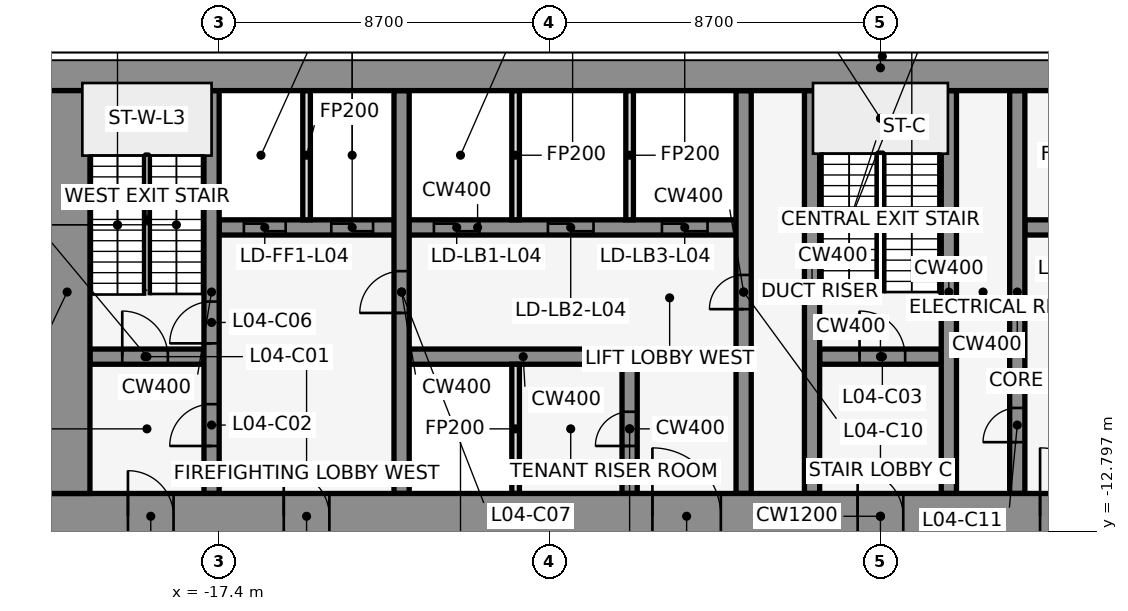
"""IFC4 building model, lengths in metres.
Left out: names, types, materials, properties, quantities, classifications, styles, units other than length and angle.
Written with IfcOpenShell. Run it as: python <this file> out.ifc"""

import sys

from ifc_helpers import new_model, si_unit, direction, frame, frame_2d, origin, place, context, subcontext, project, spatial, rectangle, extrude, element, fill, save


model = new_model("IFC4")
c1 = context("Model", 3, precision=1e-05, world=origin(), true_north=direction((0.0, 1.0)))
c2 = subcontext(c1, "Body", "Model", "MODEL_VIEW")
j1 = project(units=[si_unit("LENGTHUNIT", "METRE"), si_unit("PLANEANGLEUNIT", "RADIAN")], contexts=[c1])
p1 = place(None, origin())
s1 = spatial("IfcSite", under=j1, at=p1, CompositionType="ELEMENT")
p2 = place(p1, origin())
s2 = spatial("IfcBuilding", under=s1, at=p2, CompositionType="ELEMENT")
p3 = place(p2, frame((0.0, 0.0, 25.0)))
s3 = spatial("IfcBuildingStorey", under=s2, at=p3, CompositionType="ELEMENT", Elevation=25.0)
p4 = place(p3, frame((-20.8, -8.2, 0.0), z_axis=(0.0, 0.0, 1.0), x_axis=(1.0, 0.0, 0.0)))
e1 = element("IfcWall", 1, at=p4, inside=s3, PredefinedType="SHEAR", context=c2, shape_type="SweptSolid", body=[
    extrude(rectangle(XDim=3.0, YDim=0.4, at=frame_2d((1.5, 0.0))), origin(), (0.0, 0.0, 1.0), 5.0),
])
p5 = place(p4, frame((0.85, 0.0, 0.0)))
e2 = element("IfcOpeningElement", 2, at=p5, cuts=e1, PredefinedType="OPENING", context=c2, shape_type="SweptSolid", body=[
    extrude(rectangle(XDim=1.2, YDim=2.1, at=frame_2d((0.6, 1.05))), frame((0.0, 0.212, 0.0), z_axis=(0.0, -1.0, 0.0), x_axis=(1.0, 0.0, 0.0)), (0.0, 0.0, 1.0), 0.424),
])
p6 = place(p3, frame((-12.4, -8.2, 0.0), z_axis=(0.0, 0.0, 1.0), x_axis=(1.0, 0.0, 0.0)))
e3 = element("IfcWall", 3, at=p6, inside=s3, PredefinedType="SHEAR", context=c2, shape_type="SweptSolid", body=[
    extrude(rectangle(XDim=6.0, YDim=0.4, at=frame_2d((3.0, 0.0))), origin(), (0.0, 0.0, 1.0), 5.0),
])
p7 = place(p3, frame((-1.6, -8.2, 0.0), z_axis=(0.0, 0.0, 1.0), x_axis=(1.0, 0.0, 0.0)))
e4 = element("IfcWall", 4, at=p7, inside=s3, PredefinedType="SHEAR", context=c2, shape_type="SweptSolid", body=[
    extrude(rectangle(XDim=3.2, YDim=0.4, at=frame_2d((1.6, 0.0))), origin(), (0.0, 0.0, 1.0), 5.0),
])
p8 = place(p7, frame((1.05, 0.0, 0.0)))
e5 = element("IfcOpeningElement", 5, at=p8, cuts=e4, PredefinedType="OPENING", context=c2, shape_type="SweptSolid", body=[
    extrude(rectangle(XDim=1.2, YDim=2.1, at=frame_2d((0.6, 1.05))), frame((0.0, 0.212, 0.0), z_axis=(0.0, -1.0, 0.0), x_axis=(1.0, 0.0, 0.0)), (0.0, 0.0, 1.0), 0.424),
])
p9 = place(p3, frame((-17.4, -4.8, 0.0), z_axis=(0.0, 0.0, 1.0), x_axis=(1.0, 0.0, 0.0)))
e6 = element("IfcWall", 6, at=p9, inside=s3, PredefinedType="SHEAR", context=c2, shape_type="SweptSolid", body=[
    extrude(rectangle(XDim=13.6, YDim=0.4, at=frame_2d((6.8, 0.0))), origin(), (0.0, 0.0, 1.0), 5.0),
])
p10 = place(p9, frame((0.65, 0.0, 0.0)))
e7 = element("IfcOpeningElement", 7, at=p10, cuts=e6, PredefinedType="OPENING", context=c2, shape_type="SweptSolid", body=[
    extrude(rectangle(XDim=1.1, YDim=2.1, at=frame_2d((0.55, 1.05))), frame((0.0, 0.212, 0.0), z_axis=(0.0, -1.0, 0.0), x_axis=(1.0, 0.0, 0.0)), (0.0, 0.0, 1.0), 0.424),
])
p11 = place(p9, frame((2.95, 0.0, 0.0)))
e8 = element("IfcOpeningElement", 8, at=p11, cuts=e6, PredefinedType="OPENING", context=c2, shape_type="SweptSolid", body=[
    extrude(rectangle(XDim=1.1, YDim=2.1, at=frame_2d((0.55, 1.05))), frame((0.0, 0.212, 0.0), z_axis=(0.0, -1.0, 0.0), x_axis=(1.0, 0.0, 0.0)), (0.0, 0.0, 1.0), 0.424),
])
p12 = place(p9, frame((5.65, 0.0, 0.0)))
e9 = element("IfcOpeningElement", 9, at=p12, cuts=e6, PredefinedType="OPENING", context=c2, shape_type="SweptSolid", body=[
    extrude(rectangle(XDim=1.2, YDim=2.1, at=frame_2d((0.6, 1.05))), frame((0.0, 0.212, 0.0), z_axis=(0.0, -1.0, 0.0), x_axis=(1.0, 0.0, 0.0)), (0.0, 0.0, 1.0), 0.424),
])
p13 = place(p9, frame((8.65, 0.0, 0.0)))
e10 = element("IfcOpeningElement", 10, at=p13, cuts=e6, PredefinedType="OPENING", context=c2, shape_type="SweptSolid", body=[
    extrude(rectangle(XDim=1.2, YDim=2.1, at=frame_2d((0.6, 1.05))), frame((0.0, 0.212, 0.0), z_axis=(0.0, -1.0, 0.0), x_axis=(1.0, 0.0, 0.0)), (0.0, 0.0, 1.0), 0.424),
])
p14 = place(p9, frame((11.65, 0.0, 0.0)))
e11 = element("IfcOpeningElement", 11, at=p14, cuts=e6, PredefinedType="OPENING", context=c2, shape_type="SweptSolid", body=[
    extrude(rectangle(XDim=1.2, YDim=2.1, at=frame_2d((0.6, 1.05))), frame((0.0, 0.212, 0.0), z_axis=(0.0, -1.0, 0.0), x_axis=(1.0, 0.0, 0.0)), (0.0, 0.0, 1.0), 0.424),
])
p15 = place(p3, frame((3.8, -4.8, 0.0), z_axis=(0.0, 0.0, 1.0), x_axis=(1.0, 0.0, 0.0)))
e12 = element("IfcWall", 12, at=p15, inside=s3, PredefinedType="SHEAR", context=c2, shape_type="SweptSolid", body=[
    extrude(rectangle(XDim=13.6, YDim=0.4, at=frame_2d((6.8, 0.0))), origin(), (0.0, 0.0, 1.0), 5.0),
])
p16 = place(p15, frame((9.45, 0.0, 0.0)))
e13 = element("IfcOpeningElement", 13, at=p16, cuts=e12, PredefinedType="OPENING", context=c2, shape_type="SweptSolid", body=[
    extrude(rectangle(XDim=1.1, YDim=2.1, at=frame_2d((0.55, 1.05))), frame((0.0, 0.212, 0.0), z_axis=(0.0, -1.0, 0.0), x_axis=(1.0, 0.0, 0.0)), (0.0, 0.0, 1.0), 0.424),
])
p17 = place(p15, frame((11.85, 0.0, 0.0)))
e14 = element("IfcOpeningElement", 14, at=p17, cuts=e12, PredefinedType="OPENING", context=c2, shape_type="SweptSolid", body=[
    extrude(rectangle(XDim=1.1, YDim=2.1, at=frame_2d((0.55, 1.05))), frame((0.0, 0.212, 0.0), z_axis=(0.0, -1.0, 0.0), x_axis=(1.0, 0.0, 0.0)), (0.0, 0.0, 1.0), 0.424),
])
p18 = place(p15, frame((0.95, 0.0, 0.0)))
e15 = element("IfcOpeningElement", 15, at=p18, cuts=e12, PredefinedType="OPENING", context=c2, shape_type="SweptSolid", body=[
    extrude(rectangle(XDim=0.9, YDim=2.1, at=frame_2d((0.45, 1.05))), frame((0.0, 0.212, 0.0), z_axis=(0.0, -1.0, 0.0), x_axis=(1.0, 0.0, 0.0)), (0.0, 0.0, 1.0), 0.424),
])
p19 = place(p15, frame((3.85, 0.0, 0.0)))
e16 = element("IfcOpeningElement", 16, at=p19, cuts=e12, PredefinedType="OPENING", context=c2, shape_type="SweptSolid", body=[
    extrude(rectangle(XDim=0.9, YDim=2.1, at=frame_2d((0.45, 1.05))), frame((0.0, 0.212, 0.0), z_axis=(0.0, -1.0, 0.0), x_axis=(1.0, 0.0, 0.0)), (0.0, 0.0, 1.0), 0.424),
])
p20 = place(p15, frame((6.85, 0.0, 0.0)))
e17 = element("IfcOpeningElement", 17, at=p20, cuts=e12, PredefinedType="OPENING", context=c2, shape_type="SweptSolid", body=[
    extrude(rectangle(XDim=0.9, YDim=2.1, at=frame_2d((0.45, 1.05))), frame((0.0, 0.212, 0.0), z_axis=(0.0, -1.0, 0.0), x_axis=(1.0, 0.0, 0.0)), (0.0, 0.0, 1.0), 0.424),
])
p21 = place(p3, frame((-17.6, -11.8, 0.0), z_axis=(0.0, 0.0, 1.0), x_axis=(0.0, 1.0, 0.0)))
e18 = element("IfcWall", 18, at=p21, inside=s3, PredefinedType="SHEAR", context=c2, shape_type="SweptSolid", body=[
    extrude(rectangle(XDim=10.6, YDim=0.4, at=frame_2d((5.3, 0.0))), origin(), (0.0, 0.0, 1.0), 5.0),
])
p22 = place(p21, frame((1.25, 0.0, 0.0)))
e19 = element("IfcOpeningElement", 19, at=p22, cuts=e18, PredefinedType="OPENING", context=c2, shape_type="SweptSolid", body=[
    extrude(rectangle(XDim=1.1, YDim=2.1, at=frame_2d((0.55, 1.05))), frame((0.0, 0.212, 0.0), z_axis=(0.0, -1.0, 0.0), x_axis=(1.0, 0.0, 0.0)), (0.0, 0.0, 1.0), 0.424),
])
p23 = place(p21, frame((3.95, 0.0, 0.0)))
e20 = element("IfcOpeningElement", 20, at=p23, cuts=e18, PredefinedType="OPENING", context=c2, shape_type="SweptSolid", body=[
    extrude(rectangle(XDim=1.1, YDim=2.1, at=frame_2d((0.55, 1.05))), frame((0.0, 0.212, 0.0), z_axis=(0.0, -1.0, 0.0), x_axis=(1.0, 0.0, 0.0)), (0.0, 0.0, 1.0), 0.424),
])
p24 = place(p3, frame((-15.1, -4.6, 0.0), z_axis=(0.0, 0.0, 1.0), x_axis=(0.0, 1.0, 0.0)))
e21 = element("IfcWall", 21, at=p24, inside=s3, PredefinedType="PARTITIONING", context=c2, shape_type="SweptSolid", body=[
    extrude(rectangle(XDim=3.4, YDim=0.2, at=frame_2d((1.7, 0.0))), origin(), (0.0, 0.0, 1.0), 4.7),
])
p25 = place(p3, frame((-12.6, -11.8, 0.0), z_axis=(0.0, 0.0, 1.0), x_axis=(0.0, 1.0, 0.0)))
e22 = element("IfcWall", 22, at=p25, inside=s3, PredefinedType="SHEAR", context=c2, shape_type="SweptSolid", body=[
    extrude(rectangle(XDim=10.6, YDim=0.4, at=frame_2d((5.3, 0.0))), origin(), (0.0, 0.0, 1.0), 5.0),
])
p26 = place(p25, frame((4.75, 0.0, 0.0)))
e23 = element("IfcOpeningElement", 23, at=p26, cuts=e22, PredefinedType="OPENING", context=c2, shape_type="SweptSolid", body=[
    extrude(rectangle(XDim=1.1, YDim=2.1, at=frame_2d((0.55, 1.05))), frame((0.0, 0.212, 0.0), z_axis=(0.0, -1.0, 0.0), x_axis=(1.0, 0.0, 0.0)), (0.0, 0.0, 1.0), 0.424),
])
for number, where, z_axis, x_axis in (
    (24, (-9.6, -11.8, 0.0), (0.0, 0.0, 1.0), (0.0, 1.0, 0.0)),
    (25, (-9.6, -4.6, 0.0), (0.0, 0.0, 1.0), (0.0, 1.0, 0.0)),
):
    element("IfcWall", number, at=place(p3, frame(where, z_axis=z_axis, x_axis=x_axis)), inside=s3, PredefinedType="PARTITIONING", context=c2, shape_type="SweptSolid", body=[
        extrude(rectangle(XDim=3.4, YDim=0.2, at=frame_2d((1.7, 0.0))), origin(), (0.0, 0.0, 1.0), 4.7),
    ])
p27 = place(p3, frame((-6.6, -11.8, 0.0), z_axis=(0.0, 0.0, 1.0), x_axis=(0.0, 1.0, 0.0)))
e26 = element("IfcWall", 26, at=p27, inside=s3, PredefinedType="SHEAR", context=c2, shape_type="SweptSolid", body=[
    extrude(rectangle(XDim=3.4, YDim=0.4, at=frame_2d((1.7, 0.0))), origin(), (0.0, 0.0, 1.0), 5.0),
])
p28 = place(p27, frame((1.25, 0.0, 0.0)))
e27 = element("IfcOpeningElement", 27, at=p28, cuts=e26, PredefinedType="OPENING", context=c2, shape_type="SweptSolid", body=[
    extrude(rectangle(XDim=0.9, YDim=2.1, at=frame_2d((0.45, 1.05))), frame((0.0, 0.212, 0.0), z_axis=(0.0, -1.0, 0.0), x_axis=(1.0, 0.0, 0.0)), (0.0, 0.0, 1.0), 0.424),
])
p29 = place(p3, frame((-6.6, -4.6, 0.0), z_axis=(0.0, 0.0, 1.0), x_axis=(0.0, 1.0, 0.0)))
e28 = element("IfcWall", 28, at=p29, inside=s3, PredefinedType="PARTITIONING", context=c2, shape_type="SweptSolid", body=[
    extrude(rectangle(XDim=3.4, YDim=0.2, at=frame_2d((1.7, 0.0))), origin(), (0.0, 0.0, 1.0), 4.7),
])
p30 = place(p3, frame((-3.6, -11.8, 0.0), z_axis=(0.0, 0.0, 1.0), x_axis=(0.0, 1.0, 0.0)))
e29 = element("IfcWall", 29, at=p30, inside=s3, PredefinedType="SHEAR", context=c2, shape_type="SweptSolid", body=[
    extrude(rectangle(XDim=10.6, YDim=0.4, at=frame_2d((5.3, 0.0))), origin(), (0.0, 0.0, 1.0), 5.0),
])
p31 = place(p30, frame((4.85, 0.0, 0.0)))
e30 = element("IfcOpeningElement", 30, at=p31, cuts=e29, PredefinedType="OPENING", context=c2, shape_type="SweptSolid", body=[
    extrude(rectangle(XDim=0.9, YDim=2.1, at=frame_2d((0.45, 1.05))), frame((0.0, 0.212, 0.0), z_axis=(0.0, -1.0, 0.0), x_axis=(1.0, 0.0, 0.0)), (0.0, 0.0, 1.0), 0.424),
])
for number, where, z_axis, x_axis in (
    (31, (-1.8, -11.8, 0.0), (0.0, 0.0, 1.0), (0.0, 1.0, 0.0)),
    (32, (1.8, -11.8, 0.0), (0.0, 0.0, 1.0), (0.0, 1.0, 0.0)),
):
    element("IfcWall", number, at=place(p3, frame(where, z_axis=z_axis, x_axis=x_axis)), inside=s3, PredefinedType="SHEAR", context=c2, shape_type="SweptSolid", body=[
        extrude(rectangle(XDim=10.6, YDim=0.4, at=frame_2d((5.3, 0.0))), origin(), (0.0, 0.0, 1.0), 5.0),
    ])
p32 = place(p3, frame((3.6, -11.8, 0.0), z_axis=(0.0, 0.0, 1.0), x_axis=(0.0, 1.0, 0.0)))
e33 = element("IfcWall", 33, at=p32, inside=s3, PredefinedType="SHEAR", context=c2, shape_type="SweptSolid", body=[
    extrude(rectangle(XDim=10.6, YDim=0.4, at=frame_2d((5.3, 0.0))), origin(), (0.0, 0.0, 1.0), 5.0),
])
p33 = place(p32, frame((1.35, 0.0, 0.0)))
e34 = element("IfcOpeningElement", 34, at=p33, cuts=e33, PredefinedType="OPENING", context=c2, shape_type="SweptSolid", body=[
    extrude(rectangle(XDim=0.9, YDim=2.1, at=frame_2d((0.45, 1.05))), frame((0.0, 0.212, 0.0), z_axis=(0.0, -1.0, 0.0), x_axis=(1.0, 0.0, 0.0)), (0.0, 0.0, 1.0), 0.424),
])
p34 = place(p3, frame((-22.0, -0.6, 0.0), z_axis=(0.0, 0.0, 1.0), x_axis=(1.0, 0.0, 0.0)))
e35 = element("IfcWall", 35, at=p34, inside=s3, PredefinedType="SHEAR", context=c2, shape_type="SweptSolid", body=[
    extrude(rectangle(XDim=44.0, YDim=1.2, at=frame_2d((22.0, 0.0))), origin(), (0.0, 0.0, 1.0), 5.0),
])
p35 = place(p3, frame((-22.0, -12.4, 0.0), z_axis=(0.0, 0.0, 1.0), x_axis=(1.0, 0.0, 0.0)))
e36 = element("IfcWall", 36, at=p35, inside=s3, PredefinedType="SHEAR", context=c2, shape_type="SweptSolid", body=[
    extrude(rectangle(XDim=44.0, YDim=1.2, at=frame_2d((22.0, 0.0))), origin(), (0.0, 0.0, 1.0), 5.0),
])
p36 = place(p35, frame((2.2, 0.0, 0.0)))
e37 = element("IfcOpeningElement", 37, at=p36, cuts=e36, PredefinedType="OPENING", context=c2, shape_type="SweptSolid", body=[
    extrude(rectangle(XDim=1.2, YDim=2.1, at=frame_2d((0.6, 1.05))), frame((0.0, 0.612, 0.0), z_axis=(0.0, -1.0, 0.0), x_axis=(1.0, 0.0, 0.0)), (0.0, 0.0, 1.0), 1.224),
])
p37 = place(p35, frame((21.4, 0.0, 0.0)))
e38 = element("IfcOpeningElement", 38, at=p37, cuts=e36, PredefinedType="OPENING", context=c2, shape_type="SweptSolid", body=[
    extrude(rectangle(XDim=1.2, YDim=2.1, at=frame_2d((0.6, 1.05))), frame((0.0, 0.612, 0.0), z_axis=(0.0, -1.0, 0.0), x_axis=(1.0, 0.0, 0.0)), (0.0, 0.0, 1.0), 1.224),
])
p38 = place(p35, frame((40.6, 0.0, 0.0)))
e39 = element("IfcOpeningElement", 39, at=p38, cuts=e36, PredefinedType="OPENING", context=c2, shape_type="SweptSolid", body=[
    extrude(rectangle(XDim=1.2, YDim=2.1, at=frame_2d((0.6, 1.05))), frame((0.0, 0.612, 0.0), z_axis=(0.0, -1.0, 0.0), x_axis=(1.0, 0.0, 0.0)), (0.0, 0.0, 1.0), 1.224),
])
p39 = place(p35, frame((16.0, 0.0, 0.0)))
e40 = element("IfcOpeningElement", 40, at=p39, cuts=e36, PredefinedType="OPENING", context=c2, shape_type="SweptSolid", body=[
    extrude(rectangle(XDim=1.8, YDim=2.1, at=frame_2d((0.9, 1.05))), frame((0.0, 0.612, 0.0), z_axis=(0.0, -1.0, 0.0), x_axis=(1.0, 0.0, 0.0)), (0.0, 0.0, 1.0), 1.224),
])
p40 = place(p35, frame((6.3, 0.0, 0.0)))
e41 = element("IfcOpeningElement", 41, at=p40, cuts=e36, PredefinedType="OPENING", context=c2, shape_type="SweptSolid", body=[
    extrude(rectangle(XDim=1.2, YDim=2.1, at=frame_2d((0.6, 1.05))), frame((0.0, 0.612, 0.0), z_axis=(0.0, -1.0, 0.0), x_axis=(1.0, 0.0, 0.0)), (0.0, 0.0, 1.0), 1.224),
])
p41 = place(p35, frame((26.2, 0.0, 0.0)))
e42 = element("IfcOpeningElement", 42, at=p41, cuts=e36, PredefinedType="OPENING", context=c2, shape_type="SweptSolid", body=[
    extrude(rectangle(XDim=1.8, YDim=2.1, at=frame_2d((0.9, 1.05))), frame((0.0, 0.612, 0.0), z_axis=(0.0, -1.0, 0.0), x_axis=(1.0, 0.0, 0.0)), (0.0, 0.0, 1.0), 1.224),
])
p42 = place(p35, frame((36.5, 0.0, 0.0)))
e43 = element("IfcOpeningElement", 43, at=p42, cuts=e36, PredefinedType="OPENING", context=c2, shape_type="SweptSolid", body=[
    extrude(rectangle(XDim=1.2, YDim=2.1, at=frame_2d((0.6, 1.05))), frame((0.0, 0.612, 0.0), z_axis=(0.0, -1.0, 0.0), x_axis=(1.0, 0.0, 0.0)), (0.0, 0.0, 1.0), 1.224),
])
p43 = place(p3, frame((-21.4, -11.8, 0.0), z_axis=(0.0, 0.0, 1.0), x_axis=(0.0, 1.0, 0.0)))
e44 = element("IfcWall", 44, at=p43, inside=s3, PredefinedType="SHEAR", context=c2, shape_type="SweptSolid", body=[
    extrude(rectangle(XDim=10.6, YDim=1.2, at=frame_2d((5.3, 0.0))), origin(), (0.0, 0.0, 1.0), 5.0),
])
p44 = place(p5, origin())
e45 = element("IfcDoor", 45, at=p44, inside=s3, OperationType="SINGLE_SWING_LEFT", PredefinedType="DOOR", context=c2, shape_type="SweptSolid", body=[
    extrude(rectangle(XDim=1.2, YDim=2.1, at=frame_2d((0.6, 1.05))), frame((0.0, 0.025, 0.0), z_axis=(0.0, -1.0, 0.0), x_axis=(1.0, 0.0, 0.0)), (0.0, 0.0, 1.0), 0.05),
])
fill(e2, e45)
p45 = place(p22, frame((1.1, 0.0, 0.0), z_axis=(0.0, 0.0, 1.0), x_axis=(-1.0, 0.0, 0.0)))
e46 = element("IfcDoor", 46, at=p45, inside=s3, OperationType="SINGLE_SWING_LEFT", PredefinedType="DOOR", context=c2, shape_type="SweptSolid", body=[
    extrude(rectangle(XDim=1.1, YDim=2.1, at=frame_2d((0.55, 1.05))), frame((0.0, 0.025, 0.0), z_axis=(0.0, -1.0, 0.0), x_axis=(1.0, 0.0, 0.0)), (0.0, 0.0, 1.0), 0.05),
])
fill(e19, e46)
p46 = place(p8, origin())
e47 = element("IfcDoor", 47, at=p46, inside=s3, OperationType="SINGLE_SWING_LEFT", PredefinedType="DOOR", context=c2, shape_type="SweptSolid", body=[
    extrude(rectangle(XDim=1.2, YDim=2.1, at=frame_2d((0.6, 1.05))), frame((0.0, 0.025, 0.0), z_axis=(0.0, -1.0, 0.0), x_axis=(1.0, 0.0, 0.0)), (0.0, 0.0, 1.0), 0.05),
])
fill(e5, e47)
p47 = place(p10, origin())
e48 = element("IfcDoor", 48, at=p47, inside=s3, OperationType="DOUBLE_DOOR_SLIDING", PredefinedType="DOOR", context=c2, shape_type="SweptSolid", body=[
    extrude(rectangle(XDim=1.1, YDim=2.1, at=frame_2d((0.55, 1.05))), frame((0.0, 0.025, 0.0), z_axis=(0.0, -1.0, 0.0), x_axis=(1.0, 0.0, 0.0)), (0.0, 0.0, 1.0), 0.05),
])
fill(e7, e48)
p48 = place(p11, origin())
e49 = element("IfcDoor", 49, at=p48, inside=s3, OperationType="DOUBLE_DOOR_SLIDING", PredefinedType="DOOR", context=c2, shape_type="SweptSolid", body=[
    extrude(rectangle(XDim=1.1, YDim=2.1, at=frame_2d((0.55, 1.05))), frame((0.0, 0.025, 0.0), z_axis=(0.0, -1.0, 0.0), x_axis=(1.0, 0.0, 0.0)), (0.0, 0.0, 1.0), 0.05),
])
fill(e8, e49)
p49 = place(p12, origin())
e50 = element("IfcDoor", 50, at=p49, inside=s3, OperationType="DOUBLE_DOOR_SLIDING", PredefinedType="DOOR", context=c2, shape_type="SweptSolid", body=[
    extrude(rectangle(XDim=1.2, YDim=2.1, at=frame_2d((0.6, 1.05))), frame((0.0, 0.025, 0.0), z_axis=(0.0, -1.0, 0.0), x_axis=(1.0, 0.0, 0.0)), (0.0, 0.0, 1.0), 0.05),
])
fill(e9, e50)
p50 = place(p13, origin())
e51 = element("IfcDoor", 51, at=p50, inside=s3, OperationType="DOUBLE_DOOR_SLIDING", PredefinedType="DOOR", context=c2, shape_type="SweptSolid", body=[
    extrude(rectangle(XDim=1.2, YDim=2.1, at=frame_2d((0.6, 1.05))), frame((0.0, 0.025, 0.0), z_axis=(0.0, -1.0, 0.0), x_axis=(1.0, 0.0, 0.0)), (0.0, 0.0, 1.0), 0.05),
])
fill(e10, e51)
p51 = place(p14, origin())
e52 = element("IfcDoor", 52, at=p51, inside=s3, OperationType="DOUBLE_DOOR_SLIDING", PredefinedType="DOOR", context=c2, shape_type="SweptSolid", body=[
    extrude(rectangle(XDim=1.2, YDim=2.1, at=frame_2d((0.6, 1.05))), frame((0.0, 0.025, 0.0), z_axis=(0.0, -1.0, 0.0), x_axis=(1.0, 0.0, 0.0)), (0.0, 0.0, 1.0), 0.05),
])
fill(e11, e52)
p52 = place(p23, frame((1.1, 0.0, 0.0), z_axis=(0.0, 0.0, 1.0), x_axis=(-1.0, 0.0, 0.0)))
e53 = element("IfcDoor", 53, at=p52, inside=s3, OperationType="SINGLE_SWING_LEFT", PredefinedType="DOOR", context=c2, shape_type="SweptSolid", body=[
    extrude(rectangle(XDim=1.1, YDim=2.1, at=frame_2d((0.55, 1.05))), frame((0.0, 0.025, 0.0), z_axis=(0.0, -1.0, 0.0), x_axis=(1.0, 0.0, 0.0)), (0.0, 0.0, 1.0), 0.05),
])
fill(e20, e53)
p53 = place(p26, origin())
e54 = element("IfcDoor", 54, at=p53, inside=s3, OperationType="SINGLE_SWING_LEFT", PredefinedType="DOOR", context=c2, shape_type="SweptSolid", body=[
    extrude(rectangle(XDim=1.1, YDim=2.1, at=frame_2d((0.55, 1.05))), frame((0.0, 0.025, 0.0), z_axis=(0.0, -1.0, 0.0), x_axis=(1.0, 0.0, 0.0)), (0.0, 0.0, 1.0), 0.05),
])
fill(e23, e54)
p54 = place(p31, frame((0.9, 0.0, 0.0), z_axis=(0.0, 0.0, 1.0), x_axis=(-1.0, 0.0, 0.0)))
e55 = element("IfcDoor", 55, at=p54, inside=s3, OperationType="SINGLE_SWING_LEFT", PredefinedType="DOOR", context=c2, shape_type="SweptSolid", body=[
    extrude(rectangle(XDim=0.9, YDim=2.1, at=frame_2d((0.45, 1.05))), frame((0.0, 0.025, 0.0), z_axis=(0.0, -1.0, 0.0), x_axis=(1.0, 0.0, 0.0)), (0.0, 0.0, 1.0), 0.05),
])
fill(e30, e55)
p55 = place(p33, origin())
e56 = element("IfcDoor", 56, at=p55, inside=s3, OperationType="SINGLE_SWING_LEFT", PredefinedType="DOOR", context=c2, shape_type="SweptSolid", body=[
    extrude(rectangle(XDim=0.9, YDim=2.1, at=frame_2d((0.45, 1.05))), frame((0.0, 0.025, 0.0), z_axis=(0.0, -1.0, 0.0), x_axis=(1.0, 0.0, 0.0)), (0.0, 0.0, 1.0), 0.05),
])
fill(e34, e56)
p56 = place(p28, origin())
e57 = element("IfcDoor", 57, at=p56, inside=s3, OperationType="SINGLE_SWING_LEFT", PredefinedType="DOOR", context=c2, shape_type="SweptSolid", body=[
    extrude(rectangle(XDim=0.9, YDim=2.1, at=frame_2d((0.45, 1.05))), frame((0.0, 0.025, 0.0), z_axis=(0.0, -1.0, 0.0), x_axis=(1.0, 0.0, 0.0)), (0.0, 0.0, 1.0), 0.05),
])
fill(e27, e57)
p57 = place(p36, frame((1.2, 0.0, 0.0), z_axis=(0.0, 0.0, 1.0), x_axis=(-1.0, 0.0, 0.0)))
e58 = element("IfcDoor", 58, at=p57, inside=s3, OperationType="SINGLE_SWING_RIGHT", PredefinedType="DOOR", context=c2, shape_type="SweptSolid", body=[
    extrude(rectangle(XDim=1.2, YDim=2.1, at=frame_2d((0.6, 1.05))), frame((0.0, 0.025, 0.0), z_axis=(0.0, -1.0, 0.0), x_axis=(1.0, 0.0, 0.0)), (0.0, 0.0, 1.0), 0.05),
])
fill(e37, e58)
p58 = place(p37, frame((1.2, 0.0, 0.0), z_axis=(0.0, 0.0, 1.0), x_axis=(-1.0, 0.0, 0.0)))
e59 = element("IfcDoor", 59, at=p58, inside=s3, OperationType="SINGLE_SWING_RIGHT", PredefinedType="DOOR", context=c2, shape_type="SweptSolid", body=[
    extrude(rectangle(XDim=1.2, YDim=2.1, at=frame_2d((0.6, 1.05))), frame((0.0, 0.025, 0.0), z_axis=(0.0, -1.0, 0.0), x_axis=(1.0, 0.0, 0.0)), (0.0, 0.0, 1.0), 0.05),
])
fill(e38, e59)
p59 = place(p39, origin())
e60 = element("IfcDoor", 60, at=p59, inside=s3, OperationType="SINGLE_SWING_LEFT", PredefinedType="DOOR", context=c2, shape_type="SweptSolid", body=[
    extrude(rectangle(XDim=1.8, YDim=2.1, at=frame_2d((0.9, 1.05))), frame((0.0, 0.025, 0.0), z_axis=(0.0, -1.0, 0.0), x_axis=(1.0, 0.0, 0.0)), (0.0, 0.0, 1.0), 0.05),
])
fill(e40, e60)
p60 = place(p40, frame((1.2, 0.0, 0.0), z_axis=(0.0, 0.0, 1.0), x_axis=(-1.0, 0.0, 0.0)))
e61 = element("IfcDoor", 61, at=p60, inside=s3, OperationType="SINGLE_SWING_RIGHT", PredefinedType="DOOR", context=c2, shape_type="SweptSolid", body=[
    extrude(rectangle(XDim=1.2, YDim=2.1, at=frame_2d((0.6, 1.05))), frame((0.0, 0.025, 0.0), z_axis=(0.0, -1.0, 0.0), x_axis=(1.0, 0.0, 0.0)), (0.0, 0.0, 1.0), 0.05),
])
fill(e41, e61)
p61 = place(p41, origin())
e62 = element("IfcDoor", 62, at=p61, inside=s3, OperationType="SINGLE_SWING_LEFT", PredefinedType="DOOR", context=c2, shape_type="SweptSolid", body=[
    extrude(rectangle(XDim=1.8, YDim=2.1, at=frame_2d((0.9, 1.05))), frame((0.0, 0.025, 0.0), z_axis=(0.0, -1.0, 0.0), x_axis=(1.0, 0.0, 0.0)), (0.0, 0.0, 1.0), 0.05),
])
fill(e42, e62)
save(model, sys.argv[1])
